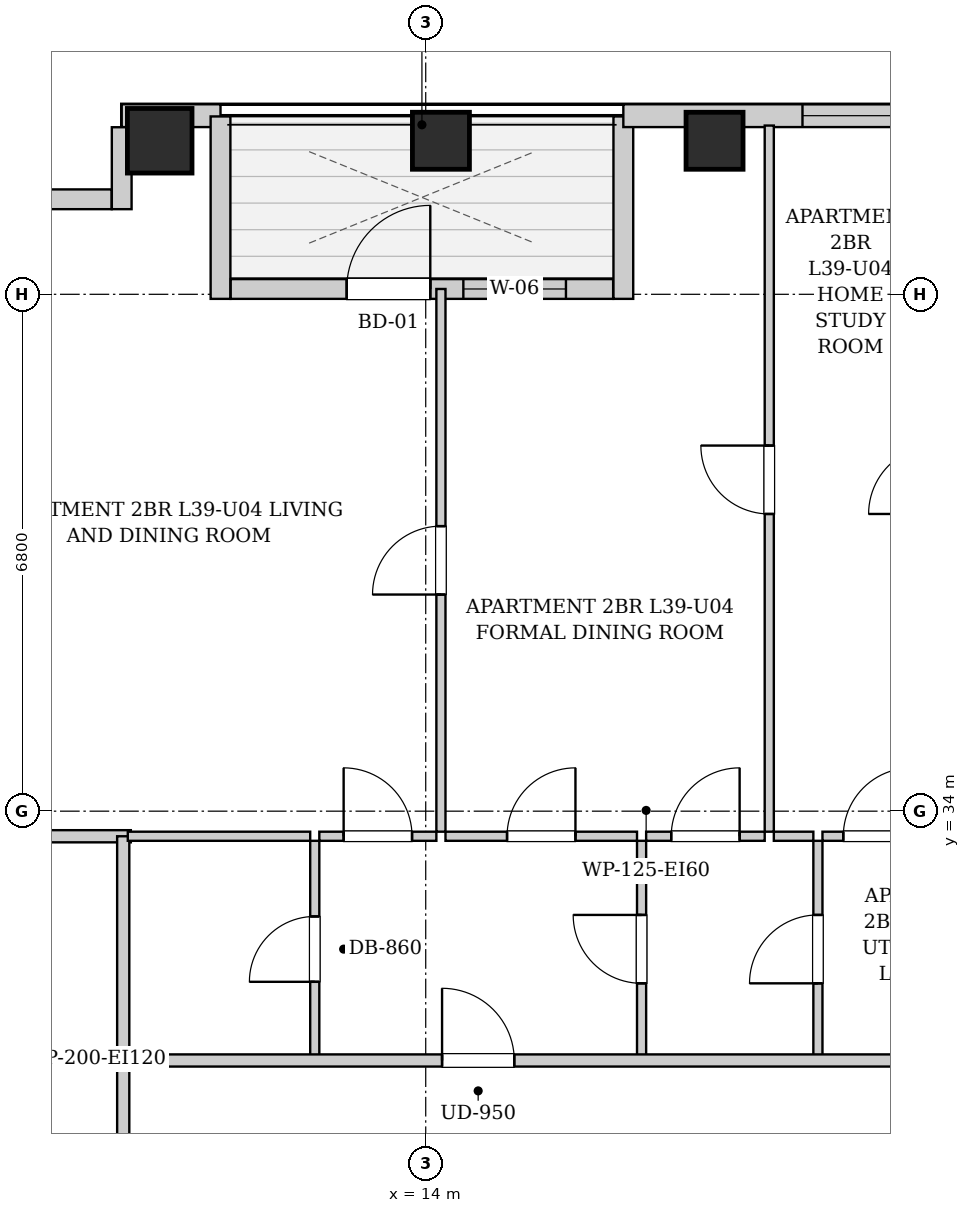
"""IFC4 building model, lengths in metres.
Left out: names, types, materials, properties, quantities, classifications, styles, units other than length and angle.
Written with IfcOpenShell. Run it as: python <this file> out.ifc"""

import sys

from ifc_helpers import new_model, si_unit, direction, frame, frame_2d, origin, origin_2d, place, context, subcontext, project, spatial, rectangle, extrude, element, fill, save


model = new_model("IFC4")
c1 = context("Model", 3, precision=1e-05, world=origin(), true_north=direction((0.0, 1.0)))
c2 = subcontext(c1, "Body", "Model", "MODEL_VIEW")
j1 = project(units=[si_unit("LENGTHUNIT", "METRE"), si_unit("PLANEANGLEUNIT", "RADIAN")], contexts=[c1])
p1 = place(None, origin())
s1 = spatial("IfcSite", under=j1, at=p1, CompositionType="ELEMENT")
p2 = place(p1, origin())
s2 = spatial("IfcBuilding", under=s1, at=p2, CompositionType="ELEMENT")
p3 = place(p2, frame((0.0, 0.0, 137.4)))
s3 = spatial("IfcBuildingStorey", under=s2, at=p3, CompositionType="ELEMENT", Elevation=137.4)
p4 = place(p3, frame((10.5, 42.82, 0.0), z_axis=(0.0, 0.0, 1.0), x_axis=(1.0, 0.0, 0.0)))
e1 = element("IfcColumn", 1, at=p4, inside=s3, PredefinedType="COLUMN", context=c2, shape_type="SweptSolid", body=[
    extrude(rectangle(XDim=0.85, YDim=0.85, at=origin_2d()), origin(), (0.0, 0.0, 1.0), 3.25),
])
for number, where, z_axis, x_axis in (
    (2, (14.2, 42.82, 0.0), (0.0, 0.0, 1.0), (1.0, 0.0, 0.0)),
    (3, (17.8, 42.82, 0.0), (0.0, 0.0, 1.0), (1.0, 0.0, 0.0)),
):
    element("IfcColumn", number, at=place(p3, frame(where, z_axis=z_axis, x_axis=x_axis)), inside=s3, PredefinedType="COLUMN", context=c2, shape_type="SweptSolid", body=[
        extrude(rectangle(XDim=0.75, YDim=0.75, at=origin_2d()), origin(), (0.0, 0.0, 1.0), 3.25),
    ])
p5 = place(p3, frame((10.0, 43.15, 0.0), z_axis=(0.0, 0.0, 1.0), x_axis=(1.0, 0.0, 0.0)))
e4 = element("IfcWall", 4, at=p5, inside=s3, PredefinedType="SOLIDWALL", context=c2, shape_type="SweptSolid", body=[
    extrude(rectangle(XDim=1.3, YDim=0.3, at=frame_2d((0.65, 0.0))), origin(), (0.0, 0.0, 1.0), 2.99),
])
p6 = place(p3, frame((11.3, 43.14, 0.0), z_axis=(0.0, 0.0, 1.0), x_axis=(0.0, -1.0, 0.0)))
e5 = element("IfcWall", 5, at=p6, inside=s3, PredefinedType="SOLIDWALL", context=c2, shape_type="SweptSolid", body=[
    extrude(rectangle(XDim=2.4, YDim=0.26, at=frame_2d((1.2, 0.0))), origin(), (0.0, 0.0, 1.0), 2.99),
])
p7 = place(p3, frame((11.434, 40.87, 0.0), z_axis=(0.0, 0.0, 1.0), x_axis=(1.0, 0.0, 0.0)))
e6 = element("IfcWall", 6, at=p7, inside=s3, PredefinedType="SOLIDWALL", context=c2, shape_type="SweptSolid", body=[
    extrude(rectangle(XDim=5.032, YDim=0.26, at=frame_2d((2.516, 0.0))), origin(), (0.0, 0.0, 1.0), 2.99),
])
p8 = place(p7, frame((1.526, 0.0, 0.0)))
e7 = element("IfcOpeningElement", 7, at=p8, cuts=e6, PredefinedType="OPENING", context=c2, shape_type="SweptSolid", body=[
    extrude(rectangle(XDim=1.1, YDim=2.0, at=frame_2d((0.55, 1.0))), frame((0.0, 0.14, 0.0), z_axis=(0.0, -1.0, 0.0), x_axis=(1.0, 0.0, 0.0)), (0.0, 0.0, 1.0), 0.28),
])
p9 = place(p7, frame((3.061, 0.0, 0.85)))
e8 = element("IfcOpeningElement", 8, at=p9, cuts=e6, PredefinedType="OPENING", context=c2, shape_type="SweptSolid", body=[
    extrude(rectangle(XDim=1.35, YDim=1.65, at=frame_2d((0.675, 0.825))), frame((0.0, 0.14, 0.0), z_axis=(0.0, -1.0, 0.0), x_axis=(1.0, 0.0, 0.0)), (0.0, 0.0, 1.0), 0.28),
])
p10 = place(p3, frame((16.6, 40.74, 0.0), z_axis=(0.0, 0.0, 1.0), x_axis=(0.0, 1.0, 0.0)))
e9 = element("IfcWall", 9, at=p10, inside=s3, PredefinedType="SOLIDWALL", context=c2, shape_type="SweptSolid", body=[
    extrude(rectangle(XDim=2.4, YDim=0.26, at=frame_2d((1.2, 0.0))), origin(), (0.0, 0.0, 1.0), 2.99),
])
p11 = place(p3, frame((16.6, 43.15, 0.0), z_axis=(0.0, 0.0, 1.0), x_axis=(1.0, 0.0, 0.0)))
e10 = element("IfcWall", 10, at=p11, inside=s3, PredefinedType="SOLIDWALL", context=c2, shape_type="SweptSolid", body=[
    extrude(rectangle(XDim=14.1, YDim=0.3, at=frame_2d((7.05, 0.0))), origin(), (0.0, 0.0, 1.0), 2.99),
])
p12 = place(p11, frame((2.357, 0.0, 0.55)))
e11 = element("IfcOpeningElement", 11, at=p12, cuts=e10, PredefinedType="OPENING", context=c2, shape_type="SweptSolid", body=[
    extrude(rectangle(XDim=1.35, YDim=1.2, at=frame_2d((0.675, 0.6))), frame((0.0, 0.16, 0.0), z_axis=(0.0, -1.0, 0.0), x_axis=(1.0, 0.0, 0.0)), (0.0, 0.0, 1.0), 0.32),
])
p13 = place(p11, frame((4.55, 0.0, 0.55)))
e12 = element("IfcOpeningElement", 12, at=p13, cuts=e10, PredefinedType="OPENING", context=c2, shape_type="SweptSolid", body=[
    extrude(rectangle(XDim=1.35, YDim=1.2, at=frame_2d((0.675, 0.6))), frame((0.0, 0.16, 0.0), z_axis=(0.0, -1.0, 0.0), x_axis=(1.0, 0.0, 0.0)), (0.0, 0.0, 1.0), 0.32),
])
p14 = place(p11, frame((10.9, 0.0, 0.55)))
e13 = element("IfcOpeningElement", 13, at=p14, cuts=e10, PredefinedType="OPENING", context=c2, shape_type="SweptSolid", body=[
    extrude(rectangle(XDim=1.35, YDim=1.2, at=frame_2d((0.675, 0.6))), frame((0.0, 0.16, 0.0), z_axis=(0.0, -1.0, 0.0), x_axis=(1.0, 0.0, 0.0)), (0.0, 0.0, 1.0), 0.32),
])
p15 = place(p11, frame((12.923, 0.0, 0.55)))
e14 = element("IfcOpeningElement", 14, at=p15, cuts=e10, PredefinedType="OPENING", context=c2, shape_type="SweptSolid", body=[
    extrude(rectangle(XDim=0.85, YDim=1.2, at=frame_2d((0.425, 0.6))), frame((0.0, 0.16, 0.0), z_axis=(0.0, -1.0, 0.0), x_axis=(1.0, 0.0, 0.0)), (0.0, 0.0, 1.0), 0.32),
])
p16 = place(p3, frame((8.882, 42.05, 0.0), z_axis=(0.0, 0.0, 1.0), x_axis=(1.0, 0.0, 0.0)))
e15 = element("IfcWall", 15, at=p16, inside=s3, PredefinedType="SOLIDWALL", context=c2, shape_type="SweptSolid", body=[
    extrude(rectangle(XDim=0.986, YDim=0.26, at=frame_2d((0.493, 0.0))), origin(), (0.0, 0.0, 1.0), 2.99),
])
p17 = place(p3, frame((10.0, 41.92, 0.0), z_axis=(0.0, 0.0, 1.0), x_axis=(0.0, 1.0, 0.0)))
e16 = element("IfcWall", 16, at=p17, inside=s3, PredefinedType="SOLIDWALL", context=c2, shape_type="SweptSolid", body=[
    extrude(rectangle(XDim=1.078, YDim=0.26, at=frame_2d((0.539, 0.0))), origin(), (0.0, 0.0, 1.0), 2.99),
])
p18 = place(p3, frame((10.02, 28.98, 0.0), z_axis=(0.0, 0.0, 1.0), x_axis=(0.0, 1.0, 0.0)))
e17 = element("IfcWall", 17, at=p18, inside=s3, PredefinedType="PARTITIONING", context=c2, shape_type="SweptSolid", body=[
    extrude(rectangle(XDim=1.74, YDim=0.16, at=frame_2d((0.87, 0.0))), origin(), (0.0, 0.0, 1.0), 2.99),
])
p19 = place(p3, frame((7.78, 33.67, 0.0), z_axis=(0.0, 0.0, 1.0), x_axis=(1.0, 0.0, 0.0)))
e18 = element("IfcWall", 18, at=p19, inside=s3, PredefinedType="PARTITIONING", context=c2, shape_type="SweptSolid", body=[
    extrude(rectangle(XDim=2.34, YDim=0.16, at=frame_2d((1.17, 0.0))), origin(), (0.0, 0.0, 1.0), 2.99),
])
p20 = place(p3, frame((10.02, 30.76, 0.0), z_axis=(0.0, 0.0, 1.0), x_axis=(0.0, 1.0, 0.0)))
e19 = element("IfcWall", 19, at=p20, inside=s3, PredefinedType="PARTITIONING", context=c2, shape_type="SweptSolid", body=[
    extrude(rectangle(XDim=2.91, YDim=0.16, at=frame_2d((1.455, 0.0))), origin(), (0.0, 0.0, 1.0), 2.99),
])
p21 = place(p3, frame((12.54, 30.76, 0.0), z_axis=(0.0, 0.0, 1.0), x_axis=(0.0, 1.0, 0.0)))
e20 = element("IfcWall", 20, at=p21, inside=s3, PredefinedType="PARTITIONING", context=c2, shape_type="SweptSolid", body=[
    extrude(rectangle(XDim=2.85, YDim=0.12, at=frame_2d((1.425, 0.0))), origin(), (0.0, 0.0, 1.0), 2.99),
])
p22 = place(p21, frame((0.995, 0.0, 0.0)))
e21 = element("IfcOpeningElement", 21, at=p22, cuts=e20, PredefinedType="OPENING", context=c2, shape_type="SweptSolid", body=[
    extrude(rectangle(XDim=0.86, YDim=2.05, at=frame_2d((0.43, 1.025))), frame((0.0, 0.07, 0.0), z_axis=(0.0, -1.0, 0.0), x_axis=(1.0, 0.0, 0.0)), (0.0, 0.0, 1.0), 0.14),
])
p23 = place(p3, frame((10.08, 33.67, 0.0), z_axis=(0.0, 0.0, 1.0), x_axis=(1.0, 0.0, 0.0)))
e22 = element("IfcWall", 22, at=p23, inside=s3, PredefinedType="PARTITIONING", context=c2, shape_type="SweptSolid", body=[
    extrude(rectangle(XDim=2.4, YDim=0.12, at=frame_2d((1.2, 0.0))), origin(), (0.0, 0.0, 1.0), 2.99),
])
p24 = place(p3, frame((16.84, 30.76, 0.0), z_axis=(0.0, 0.0, 1.0), x_axis=(0.0, 1.0, 0.0)))
e23 = element("IfcWall", 23, at=p24, inside=s3, PredefinedType="PARTITIONING", context=c2, shape_type="SweptSolid", body=[
    extrude(rectangle(XDim=2.85, YDim=0.12, at=frame_2d((1.425, 0.0))), origin(), (0.0, 0.0, 1.0), 2.99),
])
p25 = place(p24, frame((0.975, 0.0, 0.0)))
e24 = element("IfcOpeningElement", 24, at=p25, cuts=e23, PredefinedType="OPENING", context=c2, shape_type="SweptSolid", body=[
    extrude(rectangle(XDim=0.9, YDim=2.05, at=frame_2d((0.45, 1.025))), frame((0.0, 0.07, 0.0), z_axis=(0.0, -1.0, 0.0), x_axis=(1.0, 0.0, 0.0)), (0.0, 0.0, 1.0), 0.14),
])
p26 = place(p3, frame((12.6, 33.67, 0.0), z_axis=(0.0, 0.0, 1.0), x_axis=(1.0, 0.0, 0.0)))
e25 = element("IfcWall", 25, at=p26, inside=s3, PredefinedType="PARTITIONING", context=c2, shape_type="SweptSolid", body=[
    extrude(rectangle(XDim=1.54, YDim=0.12, at=frame_2d((0.77, 0.0))), origin(), (0.0, 0.0, 1.0), 2.99),
])
p27 = place(p26, frame((0.32, 0.0, 0.0)))
e26 = element("IfcOpeningElement", 26, at=p27, cuts=e25, PredefinedType="OPENING", context=c2, shape_type="SweptSolid", body=[
    extrude(rectangle(XDim=0.9, YDim=2.05, at=frame_2d((0.45, 1.025))), frame((0.0, 0.07, 0.0), z_axis=(0.0, -1.0, 0.0), x_axis=(1.0, 0.0, 0.0)), (0.0, 0.0, 1.0), 0.14),
])
p28 = place(p3, frame((14.26, 33.67, 0.0), z_axis=(0.0, 0.0, 1.0), x_axis=(1.0, 0.0, 0.0)))
e27 = element("IfcWall", 27, at=p28, inside=s3, PredefinedType="PARTITIONING", context=c2, shape_type="SweptSolid", body=[
    extrude(rectangle(XDim=2.52, YDim=0.12, at=frame_2d((1.26, 0.0))), origin(), (0.0, 0.0, 1.0), 2.99),
])
p29 = place(p28, frame((0.81, 0.0, 0.0)))
e28 = element("IfcOpeningElement", 28, at=p29, cuts=e27, PredefinedType="OPENING", context=c2, shape_type="SweptSolid", body=[
    extrude(rectangle(XDim=0.9, YDim=2.05, at=frame_2d((0.45, 1.025))), frame((0.0, 0.07, 0.0), z_axis=(0.0, -1.0, 0.0), x_axis=(1.0, 0.0, 0.0)), (0.0, 0.0, 1.0), 0.14),
])
p30 = place(p3, frame((19.16, 30.76, 0.0), z_axis=(0.0, 0.0, 1.0), x_axis=(0.0, 1.0, 0.0)))
e29 = element("IfcWall", 29, at=p30, inside=s3, PredefinedType="PARTITIONING", context=c2, shape_type="SweptSolid", body=[
    extrude(rectangle(XDim=2.85, YDim=0.12, at=frame_2d((1.425, 0.0))), origin(), (0.0, 0.0, 1.0), 2.99),
])
p31 = place(p30, frame((0.975, 0.0, 0.0)))
e30 = element("IfcOpeningElement", 30, at=p31, cuts=e29, PredefinedType="OPENING", context=c2, shape_type="SweptSolid", body=[
    extrude(rectangle(XDim=0.9, YDim=2.05, at=frame_2d((0.45, 1.025))), frame((0.0, 0.07, 0.0), z_axis=(0.0, -1.0, 0.0), x_axis=(1.0, 0.0, 0.0)), (0.0, 0.0, 1.0), 0.14),
])
p32 = place(p3, frame((16.9, 33.67, 0.0), z_axis=(0.0, 0.0, 1.0), x_axis=(1.0, 0.0, 0.0)))
e31 = element("IfcWall", 31, at=p32, inside=s3, PredefinedType="PARTITIONING", context=c2, shape_type="SweptSolid", body=[
    extrude(rectangle(XDim=1.56, YDim=0.12, at=frame_2d((0.78, 0.0))), origin(), (0.0, 0.0, 1.0), 2.99),
])
p33 = place(p32, frame((0.33, 0.0, 0.0)))
e32 = element("IfcOpeningElement", 32, at=p33, cuts=e31, PredefinedType="OPENING", context=c2, shape_type="SweptSolid", body=[
    extrude(rectangle(XDim=0.9, YDim=2.05, at=frame_2d((0.45, 1.025))), frame((0.0, 0.07, 0.0), z_axis=(0.0, -1.0, 0.0), x_axis=(1.0, 0.0, 0.0)), (0.0, 0.0, 1.0), 0.14),
])
p34 = place(p3, frame((18.58, 33.67, 0.0), z_axis=(0.0, 0.0, 1.0), x_axis=(1.0, 0.0, 0.0)))
e33 = element("IfcWall", 33, at=p34, inside=s3, PredefinedType="PARTITIONING", context=c2, shape_type="SweptSolid", body=[
    extrude(rectangle(XDim=0.52, YDim=0.12, at=frame_2d((0.26, 0.0))), origin(), (0.0, 0.0, 1.0), 2.99),
])
p35 = place(p3, frame((19.22, 33.67, 0.0), z_axis=(0.0, 0.0, 1.0), x_axis=(1.0, 0.0, 0.0)))
e34 = element("IfcWall", 34, at=p35, inside=s3, PredefinedType="PARTITIONING", context=c2, shape_type="SweptSolid", body=[
    extrude(rectangle(XDim=1.447, YDim=0.12, at=frame_2d((0.724, 0.0))), origin(), (0.0, 0.0, 1.0), 2.99),
])
p36 = place(p35, frame((0.274, 0.0, 0.0)))
e35 = element("IfcOpeningElement", 35, at=p36, cuts=e34, PredefinedType="OPENING", context=c2, shape_type="SweptSolid", body=[
    extrude(rectangle(XDim=0.9, YDim=2.05, at=frame_2d((0.45, 1.025))), frame((0.0, 0.07, 0.0), z_axis=(0.0, -1.0, 0.0), x_axis=(1.0, 0.0, 0.0)), (0.0, 0.0, 1.0), 0.14),
])
p37 = place(p3, frame((14.2, 33.73, 0.0), z_axis=(0.0, 0.0, 1.0), x_axis=(0.0, 1.0, 0.0)))
e36 = element("IfcWall", 36, at=p37, inside=s3, PredefinedType="PARTITIONING", context=c2, shape_type="SweptSolid", body=[
    extrude(rectangle(XDim=7.14, YDim=0.12, at=frame_2d((3.57, 0.0))), origin(), (0.0, 0.0, 1.0), 2.99),
])
p38 = place(p37, frame((3.12, 0.0, 0.0)))
e37 = element("IfcOpeningElement", 37, at=p38, cuts=e36, PredefinedType="OPENING", context=c2, shape_type="SweptSolid", body=[
    extrude(rectangle(XDim=0.9, YDim=2.05, at=frame_2d((0.45, 1.025))), frame((0.0, 0.07, 0.0), z_axis=(0.0, -1.0, 0.0), x_axis=(1.0, 0.0, 0.0)), (0.0, 0.0, 1.0), 0.14),
])
p39 = place(p3, frame((18.52, 33.73, 0.0), z_axis=(0.0, 0.0, 1.0), x_axis=(0.0, 1.0, 0.0)))
e38 = element("IfcWall", 38, at=p39, inside=s3, PredefinedType="PARTITIONING", context=c2, shape_type="SweptSolid", body=[
    extrude(rectangle(XDim=9.29, YDim=0.12, at=frame_2d((4.645, 0.0))), origin(), (0.0, 0.0, 1.0), 2.99),
])
p40 = place(p39, frame((4.18, 0.0, 0.0)))
e39 = element("IfcOpeningElement", 39, at=p40, cuts=e38, PredefinedType="OPENING", context=c2, shape_type="SweptSolid", body=[
    extrude(rectangle(XDim=0.9, YDim=2.05, at=frame_2d((0.45, 1.025))), frame((0.0, 0.07, 0.0), z_axis=(0.0, -1.0, 0.0), x_axis=(1.0, 0.0, 0.0)), (0.0, 0.0, 1.0), 0.14),
])
p41 = place(p3, frame((10.05, 30.72, 0.0), z_axis=(0.0, 0.0, 1.0), x_axis=(1.0, 0.0, 0.0)))
e40 = element("IfcWall", 40, at=p41, inside=s3, PredefinedType="PARTITIONING", context=c2, shape_type="SweptSolid", body=[
    extrude(rectangle(XDim=27.7, YDim=0.16, at=frame_2d((13.85, 0.0))), origin(), (0.0, 0.0, 1.0), 2.99),
])
p42 = place(p41, frame((4.165, 0.0, 0.0)))
e41 = element("IfcOpeningElement", 41, at=p42, cuts=e40, PredefinedType="OPENING", context=c2, shape_type="SweptSolid", body=[
    extrude(rectangle(XDim=0.95, YDim=2.1, at=frame_2d((0.475, 1.05))), frame((0.0, 0.09, 0.0), z_axis=(0.0, -1.0, 0.0), x_axis=(1.0, 0.0, 0.0)), (0.0, 0.0, 1.0), 0.18),
])
p43 = place(p41, frame((23.785, 0.0, 0.0)))
e42 = element("IfcOpeningElement", 42, at=p43, cuts=e40, PredefinedType="OPENING", context=c2, shape_type="SweptSolid", body=[
    extrude(rectangle(XDim=0.95, YDim=2.1, at=frame_2d((0.475, 1.05))), frame((0.0, 0.09, 0.0), z_axis=(0.0, -1.0, 0.0), x_axis=(1.0, 0.0, 0.0)), (0.0, 0.0, 1.0), 0.18),
])
p44 = place(p22, origin())
e43 = element("IfcDoor", 43, at=p44, inside=s3, OperationType="SINGLE_SWING_LEFT", PredefinedType="DOOR", context=c2, shape_type="SweptSolid", body=[
    extrude(rectangle(XDim=0.86, YDim=2.05, at=frame_2d((0.43, 1.025))), frame((0.0, 0.025, 0.0), z_axis=(0.0, -1.0, 0.0), x_axis=(1.0, 0.0, 0.0)), (0.0, 0.0, 1.0), 0.05),
])
fill(e21, e43)
p45 = place(p25, origin())
e44 = element("IfcDoor", 44, at=p45, inside=s3, OperationType="SINGLE_SWING_RIGHT", PredefinedType="DOOR", context=c2, shape_type="SweptSolid", body=[
    extrude(rectangle(XDim=0.9, YDim=2.05, at=frame_2d((0.45, 1.025))), frame((0.0, 0.025, 0.0), z_axis=(0.0, -1.0, 0.0), x_axis=(1.0, 0.0, 0.0)), (0.0, 0.0, 1.0), 0.05),
])
fill(e24, e44)
p46 = place(p27, origin())
e45 = element("IfcDoor", 45, at=p46, inside=s3, OperationType="SINGLE_SWING_LEFT", PredefinedType="DOOR", context=c2, shape_type="SweptSolid", body=[
    extrude(rectangle(XDim=0.9, YDim=2.05, at=frame_2d((0.45, 1.025))), frame((0.0, 0.025, 0.0), z_axis=(0.0, -1.0, 0.0), x_axis=(1.0, 0.0, 0.0)), (0.0, 0.0, 1.0), 0.05),
])
fill(e26, e45)
p47 = place(p29, origin())
e46 = element("IfcDoor", 46, at=p47, inside=s3, OperationType="SINGLE_SWING_RIGHT", PredefinedType="DOOR", context=c2, shape_type="SweptSolid", body=[
    extrude(rectangle(XDim=0.9, YDim=2.05, at=frame_2d((0.45, 1.025))), frame((0.0, 0.025, 0.0), z_axis=(0.0, -1.0, 0.0), x_axis=(1.0, 0.0, 0.0)), (0.0, 0.0, 1.0), 0.05),
])
fill(e28, e46)
p48 = place(p31, origin())
e47 = element("IfcDoor", 47, at=p48, inside=s3, OperationType="SINGLE_SWING_LEFT", PredefinedType="DOOR", context=c2, shape_type="SweptSolid", body=[
    extrude(rectangle(XDim=0.9, YDim=2.05, at=frame_2d((0.45, 1.025))), frame((0.0, 0.025, 0.0), z_axis=(0.0, -1.0, 0.0), x_axis=(1.0, 0.0, 0.0)), (0.0, 0.0, 1.0), 0.05),
])
fill(e30, e47)
p49 = place(p33, origin())
e48 = element("IfcDoor", 48, at=p49, inside=s3, OperationType="SINGLE_SWING_RIGHT", PredefinedType="DOOR", context=c2, shape_type="SweptSolid", body=[
    extrude(rectangle(XDim=0.9, YDim=2.05, at=frame_2d((0.45, 1.025))), frame((0.0, 0.025, 0.0), z_axis=(0.0, -1.0, 0.0), x_axis=(1.0, 0.0, 0.0)), (0.0, 0.0, 1.0), 0.05),
])
fill(e32, e48)
p50 = place(p36, origin())
e49 = element("IfcDoor", 49, at=p50, inside=s3, OperationType="SINGLE_SWING_RIGHT", PredefinedType="DOOR", context=c2, shape_type="SweptSolid", body=[
    extrude(rectangle(XDim=0.9, YDim=2.05, at=frame_2d((0.45, 1.025))), frame((0.0, 0.025, 0.0), z_axis=(0.0, -1.0, 0.0), x_axis=(1.0, 0.0, 0.0)), (0.0, 0.0, 1.0), 0.05),
])
fill(e35, e49)
p51 = place(p38, origin())
e50 = element("IfcDoor", 50, at=p51, inside=s3, OperationType="SINGLE_SWING_LEFT", PredefinedType="DOOR", context=c2, shape_type="SweptSolid", body=[
    extrude(rectangle(XDim=0.9, YDim=2.05, at=frame_2d((0.45, 1.025))), frame((0.0, 0.025, 0.0), z_axis=(0.0, -1.0, 0.0), x_axis=(1.0, 0.0, 0.0)), (0.0, 0.0, 1.0), 0.05),
])
fill(e37, e50)
p52 = place(p40, origin())
e51 = element("IfcDoor", 51, at=p52, inside=s3, OperationType="SINGLE_SWING_RIGHT", PredefinedType="DOOR", context=c2, shape_type="SweptSolid", body=[
    extrude(rectangle(XDim=0.9, YDim=2.05, at=frame_2d((0.45, 1.025))), frame((0.0, 0.025, 0.0), z_axis=(0.0, -1.0, 0.0), x_axis=(1.0, 0.0, 0.0)), (0.0, 0.0, 1.0), 0.05),
])
fill(e39, e51)
p53 = place(p42, origin())
e52 = element("IfcDoor", 52, at=p53, inside=s3, OperationType="SINGLE_SWING_LEFT", PredefinedType="DOOR", context=c2, shape_type="SweptSolid", body=[
    extrude(rectangle(XDim=0.95, YDim=2.1, at=frame_2d((0.475, 1.05))), frame((0.0, 0.025, 0.0), z_axis=(0.0, -1.0, 0.0), x_axis=(1.0, 0.0, 0.0)), (0.0, 0.0, 1.0), 0.05),
])
fill(e41, e52)
p54 = place(p8, origin())
e53 = element("IfcDoor", 53, at=p54, inside=s3, OperationType="SINGLE_SWING_RIGHT", PredefinedType="DOOR", context=c2, shape_type="SweptSolid", body=[
    extrude(rectangle(XDim=1.1, YDim=2.0, at=frame_2d((0.55, 1.0))), frame((0.0, 0.025, 0.0), z_axis=(0.0, -1.0, 0.0), x_axis=(1.0, 0.0, 0.0)), (0.0, 0.0, 1.0), 0.05),
])
fill(e7, e53)
p55 = place(p9, origin())
e54 = element("IfcWindow", 54, at=p55, inside=s3, PartitioningType="SINGLE_PANEL", PredefinedType="WINDOW", context=c2, shape_type="SweptSolid", body=[
    extrude(rectangle(XDim=1.35, YDim=1.65, at=frame_2d((0.675, 0.825))), frame((0.0, 0.03, 0.0), z_axis=(0.0, -1.0, 0.0), x_axis=(1.0, 0.0, 0.0)), (0.0, 0.0, 1.0), 0.06),
])
fill(e8, e54)
p56 = place(p12, origin())
e55 = element("IfcWindow", 55, at=p56, inside=s3, PartitioningType="SINGLE_PANEL", PredefinedType="WINDOW", context=c2, shape_type="SweptSolid", body=[
    extrude(rectangle(XDim=1.35, YDim=1.2, at=frame_2d((0.675, 0.6))), frame((0.0, 0.03, 0.0), z_axis=(0.0, -1.0, 0.0), x_axis=(1.0, 0.0, 0.0)), (0.0, 0.0, 1.0), 0.06),
])
fill(e11, e55)
save(model, sys.argv[1])
